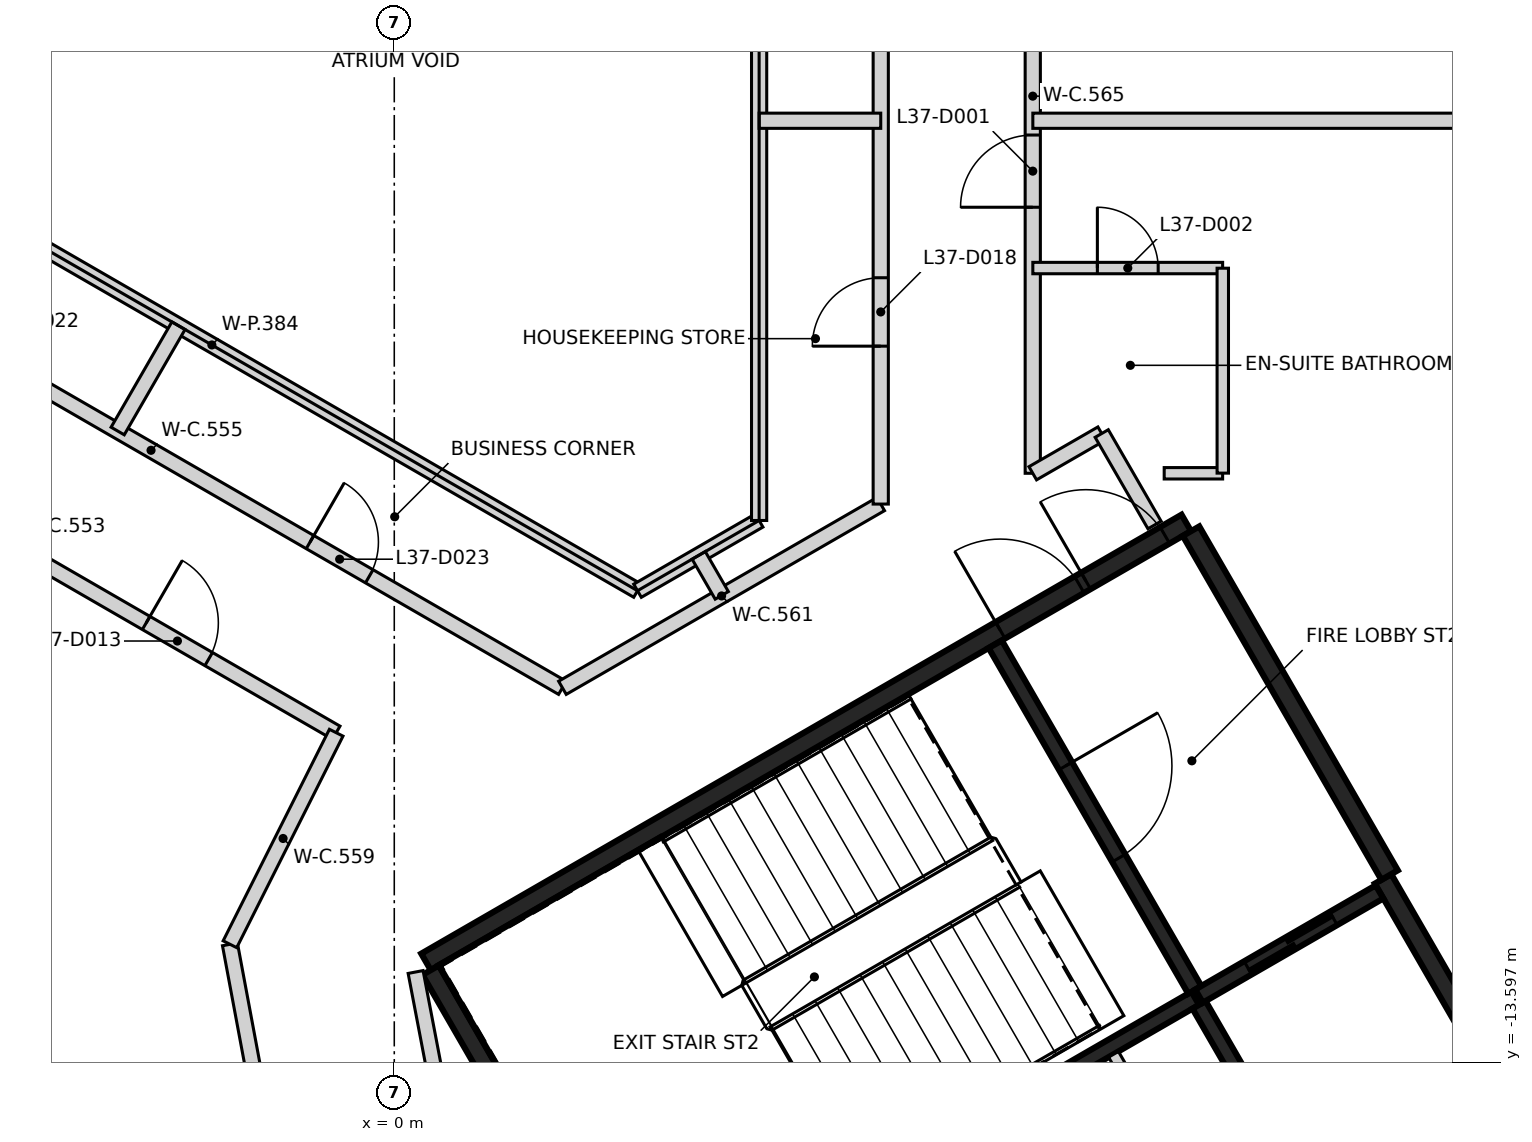
"""IFC4 building model, lengths in metres.
Left out: names, types, materials, properties, quantities, classifications, styles, units other than length and angle.
Written with IfcOpenShell. Run it as: python <this file> out.ifc"""

import sys

from ifc_helpers import new_model, si_unit, direction, frame, frame_2d, origin, place, context, subcontext, project, spatial, rectangle, extrude, element, fill, save


model = new_model("IFC4")
c1 = context("Model", 3, precision=1e-05, world=origin(), true_north=direction((0.0, 1.0)))
c2 = subcontext(c1, "Body", "Model", "MODEL_VIEW")
j1 = project(units=[si_unit("LENGTHUNIT", "METRE"), si_unit("PLANEANGLEUNIT", "RADIAN")], contexts=[c1])
p1 = place(None, origin())
s1 = spatial("IfcSite", under=j1, at=p1, CompositionType="ELEMENT")
p2 = place(p1, origin())
s2 = spatial("IfcBuilding", under=s1, at=p2, CompositionType="ELEMENT")
p3 = place(p2, frame((0.0, 0.0, 150.4)))
s3 = spatial("IfcBuildingStorey", under=s2, at=p3, CompositionType="ELEMENT", Elevation=150.4)
p4 = place(p3, frame((0.417, -12.273, 0.0), z_axis=(0.0, 0.0, 1.0), x_axis=(0.866021906294, 0.500006057782, 0.0)))
e1 = element("IfcWall", 1, at=p4, inside=s3, PredefinedType="SHEAR", context=c2, shape_type="SweptSolid", body=[
    extrude(rectangle(XDim=11.55, YDim=0.25, at=frame_2d((5.775, 0.0))), origin(), (0.0, 0.0, 1.0), 3.2),
])
p5 = place(p4, frame((10.025, 0.0, 0.0)))
e2 = element("IfcOpeningElement", 2, at=p5, cuts=e1, PredefinedType="OPENING", context=c2, shape_type="SweptSolid", body=[
    extrude(rectangle(XDim=1.2, YDim=2.1, at=frame_2d((0.6, 1.05))), frame((0.0, 0.135, 0.0), z_axis=(0.0, -1.0, 0.0), x_axis=(1.0, 0.0, 0.0)), (0.0, 0.0, 1.0), 0.27),
])
p6 = place(p4, frame((8.725, 0.0, 0.0)))
e3 = element("IfcOpeningElement", 3, at=p6, cuts=e1, PredefinedType="OPENING", context=c2, shape_type="SweptSolid", body=[
    extrude(rectangle(XDim=1.2, YDim=2.1, at=frame_2d((0.6, 1.05))), frame((0.0, 0.135, 0.0), z_axis=(0.0, -1.0, 0.0), x_axis=(1.0, 0.0, 0.0)), (0.0, 0.0, 1.0), 0.27),
])
p7 = place(p3, frame((13.008, -11.181, 0.0), z_axis=(0.0, 0.0, 1.0), x_axis=(0.500004234368, -0.866022959057, 0.0)))
e4 = element("IfcWall", 4, at=p7, inside=s3, PredefinedType="SHEAR", context=c2, shape_type="SweptSolid", body=[
    extrude(rectangle(XDim=6.25, YDim=0.25, at=frame_2d((3.125, 0.0))), origin(), (0.0, 0.0, 1.0), 3.2),
])
p8 = place(p3, frame((3.235, -17.153, 0.0), z_axis=(0.0, 0.0, 1.0), x_axis=(-0.500008851346, 0.866020293397, 0.0)))
e5 = element("IfcWall", 5, at=p8, inside=s3, PredefinedType="SHEAR", context=c2, shape_type="SweptSolid", body=[
    extrude(rectangle(XDim=5.51, YDim=0.25, at=frame_2d((2.755, 0.0))), origin(), (0.0, 0.0, 1.0), 3.2),
])
p9 = place(p3, frame((10.483, -6.606, 0.0), z_axis=(0.0, 0.0, 1.0), x_axis=(0.49999885962, -0.866026062182, 0.0)))
e6 = element("IfcWall", 6, at=p9, inside=s3, PredefinedType="SHEAR", context=c2, shape_type="SweptSolid", body=[
    extrude(rectangle(XDim=5.225, YDim=0.25, at=frame_2d((2.612, 0.0))), origin(), (0.0, 0.0, 1.0), 3.2),
])
p10 = place(p3, frame((10.538, -12.752, 0.0), z_axis=(0.0, 0.0, 1.0), x_axis=(-0.866038630372, -0.499977090179, 0.0)))
e7 = element("IfcWall", 7, at=p10, inside=s3, PredefinedType="SHEAR", context=c2, shape_type="SweptSolid", body=[
    extrude(rectangle(XDim=5.699, YDim=0.2, at=frame_2d((2.85, 0.0))), origin(), (0.0, 0.0, 1.0), 3.2),
])
p11 = place(p3, frame((7.906, -8.094, 0.0), z_axis=(0.0, 0.0, 1.0), x_axis=(0.500024287448, -0.866011380966, 0.0)))
e8 = element("IfcWall", 8, at=p11, inside=s3, PredefinedType="SHEAR", context=c2, shape_type="SweptSolid", body=[
    extrude(rectangle(XDim=5.251, YDim=0.2, at=frame_2d((2.625, 0.0))), origin(), (0.0, 0.0, 1.0), 3.2),
])
p12 = place(p11, frame((1.849, 0.0, 0.0)))
e9 = element("IfcOpeningElement", 9, at=p12, cuts=e8, PredefinedType="OPENING", context=c2, shape_type="SweptSolid", body=[
    extrude(rectangle(XDim=1.4, YDim=2.1, at=frame_2d((0.7, 1.05))), frame((0.0, 0.11, 0.0), z_axis=(0.0, -1.0, 0.0), x_axis=(1.0, 0.0, 0.0)), (0.0, 0.0, 1.0), 0.22),
])
p13 = place(p3, frame((11.963, -15.22, 0.0), z_axis=(0.0, 0.0, 1.0), x_axis=(-0.500034990121, 0.866005201286, 0.0)))
e10 = element("IfcWall", 10, at=p13, inside=s3, PredefinedType="SHEAR", context=c2, shape_type="SweptSolid", body=[
    extrude(rectangle(XDim=2.75, YDim=0.2, at=frame_2d((1.375, 0.0))), origin(), (0.0, 0.0, 1.0), 3.2),
])
p14 = place(p3, frame((10.587, -12.723, 0.0), z_axis=(0.0, 0.0, 1.0), x_axis=(0.866037306777, 0.499979382845, 0.0)))
e11 = element("IfcWall", 11, at=p14, inside=s3, PredefinedType="SHEAR", context=c2, shape_type="SweptSolid", body=[
    extrude(rectangle(XDim=2.742, YDim=0.2, at=frame_2d((1.371, 0.0))), origin(), (0.0, 0.0, 1.0), 3.2),
])
p15 = place(p14, frame((0.743, 0.0, 0.0)))
e12 = element("IfcOpeningElement", 12, at=p15, cuts=e11, PredefinedType="OPENING", context=c2, shape_type="SweptSolid", body=[
    extrude(rectangle(XDim=1.3, YDim=2.1, at=frame_2d((0.65, 1.05))), frame((0.0, 0.11, 0.0), z_axis=(0.0, -1.0, 0.0), x_axis=(1.0, 0.0, 0.0)), (0.0, 0.0, 1.0), 0.22),
])
p16 = place(p3, frame((9.462, -13.489, 0.0), z_axis=(0.0, 0.0, 1.0), x_axis=(0.499988999718, -0.866031754707, 0.0)))
e13 = element("IfcWall", 13, at=p16, inside=s3, PredefinedType="PARTITIONING", context=c2, shape_type="SweptSolid", body=[
    extrude(rectangle(XDim=2.749, YDim=0.15, at=frame_2d((1.374, 0.0))), origin(), (0.0, 0.0, 1.0), 3.2),
])
p17 = place(p3, frame((-9.261, -4.351, 0.0), z_axis=(0.0, 0.0, 1.0), x_axis=(0.865985037707, -0.500069909581, 0.0)))
e14 = element("IfcWall", 14, at=p17, inside=s3, PredefinedType="PARTITIONING", context=c2, shape_type="SweptSolid", body=[
    extrude(rectangle(XDim=9.812, YDim=0.2, at=frame_2d((4.906, 0.0))), origin(), (0.0, 0.0, 1.0), 3.2),
])
p18 = place(p17, frame((6.925, 0.0, 0.0)))
e15 = element("IfcOpeningElement", 15, at=p18, cuts=e14, PredefinedType="OPENING", context=c2, shape_type="SweptSolid", body=[
    extrude(rectangle(XDim=0.95, YDim=2.1, at=frame_2d((0.475, 1.05))), frame((0.0, 0.11, 0.0), z_axis=(0.0, -1.0, 0.0), x_axis=(1.0, 0.0, 0.0)), (0.0, 0.0, 1.0), 0.22),
])
p19 = place(p3, frame((-8.612, -2.418, 0.0), z_axis=(0.0, 0.0, 1.0), x_axis=(0.866023916678, -0.500002575735, 0.0)))
e16 = element("IfcWall", 16, at=p19, inside=s3, PredefinedType="PARTITIONING", context=c2, shape_type="SweptSolid", body=[
    extrude(rectangle(XDim=12.499, YDim=0.2, at=frame_2d((6.249, 0.0))), origin(), (0.0, 0.0, 1.0), 3.2),
])
p20 = place(p19, frame((2.427, 0.0, 0.0)))
e17 = element("IfcOpeningElement", 17, at=p20, cuts=e16, PredefinedType="OPENING", context=c2, shape_type="SweptSolid", body=[
    extrude(rectangle(XDim=0.9, YDim=2.1, at=frame_2d((0.45, 1.05))), frame((0.0, 0.11, 0.0), z_axis=(0.0, -1.0, 0.0), x_axis=(1.0, 0.0, 0.0)), (0.0, 0.0, 1.0), 0.22),
])
p21 = place(p19, frame((8.665, 0.0, 0.0)))
e18 = element("IfcOpeningElement", 18, at=p21, cuts=e16, PredefinedType="OPENING", context=c2, shape_type="SweptSolid", body=[
    extrude(rectangle(XDim=0.9, YDim=2.1, at=frame_2d((0.45, 1.05))), frame((0.0, 0.11, 0.0), z_axis=(0.0, -1.0, 0.0), x_axis=(1.0, 0.0, 0.0)), (0.0, 0.0, 1.0), 0.22),
])
p22 = place(p3, frame((-2.162, -12.042, 0.0), z_axis=(0.0, 0.0, 1.0), x_axis=(0.18377734651, -0.982967897192, 0.0)))
e19 = element("IfcWall", 19, at=p22, inside=s3, PredefinedType="PARTITIONING", context=c2, shape_type="SweptSolid", body=[
    extrude(rectangle(XDim=7.094, YDim=0.2, at=frame_2d((3.547, 0.0))), origin(), (0.0, 0.0, 1.0), 3.2),
])
p23 = place(p3, frame((-2.162, -12.041, 0.0), z_axis=(0.0, 0.0, 1.0), x_axis=(0.448937335771, 0.893563242614, 0.0)))
e20 = element("IfcWall", 20, at=p23, inside=s3, PredefinedType="PARTITIONING", context=c2, shape_type="SweptSolid", body=[
    extrude(rectangle(XDim=3.115, YDim=0.2, at=frame_2d((1.557, 0.0))), origin(), (0.0, 0.0, 1.0), 3.2),
])
p24 = place(p3, frame((0.281, -12.406, 0.0), z_axis=(0.0, 0.0, 1.0), x_axis=(0.187814940093, -0.982204433037, 0.0)))
e21 = element("IfcWall", 21, at=p24, inside=s3, PredefinedType="PARTITIONING", context=c2, shape_type="SweptSolid", body=[
    extrude(rectangle(XDim=5.842, YDim=0.2, at=frame_2d((2.921, 0.0))), origin(), (0.0, 0.0, 1.0), 3.2),
])
p25 = place(p24, frame((2.363, 0.0, 0.0)))
e22 = element("IfcOpeningElement", 22, at=p25, cuts=e21, PredefinedType="OPENING", context=c2, shape_type="SweptSolid", body=[
    extrude(rectangle(XDim=1.0, YDim=2.1, at=frame_2d((0.5, 1.05))), frame((0.0, 0.11, 0.0), z_axis=(0.0, -1.0, 0.0), x_axis=(1.0, 0.0, 0.0)), (0.0, 0.0, 1.0), 0.22),
])
p26 = place(p3, frame((2.212, -8.667, 0.0), z_axis=(0.0, 0.0, 1.0), x_axis=(0.866053587187, 0.499951181737, 0.0)))
e23 = element("IfcWall", 23, at=p26, inside=s3, PredefinedType="PARTITIONING", context=c2, shape_type="SweptSolid", body=[
    extrude(rectangle(XDim=4.835, YDim=0.2, at=frame_2d((2.418, 0.0))), origin(), (0.0, 0.0, 1.0), 2.3),
])
p27 = place(p3, frame((6.4, -6.25, 0.0), z_axis=(0.0, 0.0, 1.0), x_axis=(0.0, 1.0, 0.0)))
e24 = element("IfcWall", 24, at=p27, inside=s3, PredefinedType="PARTITIONING", context=c2, shape_type="SweptSolid", body=[
    extrude(rectangle(XDim=12.5, YDim=0.2, at=frame_2d((6.25, 0.0))), origin(), (0.0, 0.0, 1.0), 3.2),
])
p28 = place(p27, frame((2.077, 0.0, 0.0)))
e25 = element("IfcOpeningElement", 25, at=p28, cuts=e24, PredefinedType="OPENING", context=c2, shape_type="SweptSolid", body=[
    extrude(rectangle(XDim=0.9, YDim=2.1, at=frame_2d((0.45, 1.05))), frame((0.0, 0.11, 0.0), z_axis=(0.0, -1.0, 0.0), x_axis=(1.0, 0.0, 0.0)), (0.0, 0.0, 1.0), 0.22),
])
p29 = place(p27, frame((8.315, 0.0, 0.0)))
e26 = element("IfcOpeningElement", 26, at=p29, cuts=e24, PredefinedType="OPENING", context=c2, shape_type="SweptSolid", body=[
    extrude(rectangle(XDim=0.9, YDim=2.1, at=frame_2d((0.45, 1.05))), frame((0.0, 0.11, 0.0), z_axis=(0.0, -1.0, 0.0), x_axis=(1.0, 0.0, 0.0)), (0.0, 0.0, 1.0), 0.22),
])
p30 = place(p3, frame((8.4, -5.845, 0.0), z_axis=(0.0, 0.0, 1.0), x_axis=(0.0, 1.0, 0.0)))
e27 = element("IfcWall", 27, at=p30, inside=s3, PredefinedType="PARTITIONING", context=c2, shape_type="SweptSolid", body=[
    extrude(rectangle(XDim=9.923, YDim=0.2, at=frame_2d((4.961, 0.0))), origin(), (0.0, 0.0, 1.0), 3.2),
])
p31 = place(p30, frame((3.5, 0.0, 0.0)))
e28 = element("IfcOpeningElement", 28, at=p31, cuts=e27, PredefinedType="OPENING", context=c2, shape_type="SweptSolid", body=[
    extrude(rectangle(XDim=0.95, YDim=2.1, at=frame_2d((0.475, 1.05))), frame((0.0, 0.11, 0.0), z_axis=(0.0, -1.0, 0.0), x_axis=(1.0, 0.0, 0.0)), (0.0, 0.0, 1.0), 0.22),
])
p32 = place(p30, frame((6.023, 0.0, 0.0)))
e29 = element("IfcOpeningElement", 29, at=p32, cuts=e27, PredefinedType="OPENING", context=c2, shape_type="SweptSolid", body=[
    extrude(rectangle(XDim=0.95, YDim=2.1, at=frame_2d((0.475, 1.05))), frame((0.0, 0.11, 0.0), z_axis=(0.0, -1.0, 0.0), x_axis=(1.0, 0.0, 0.0)), (0.0, 0.0, 1.0), 0.22),
])
p33 = place(p3, frame((8.4, -5.845, 0.0), z_axis=(0.0, 0.0, 1.0), x_axis=(0.866313671633, 0.499500372715, 0.0)))
e30 = element("IfcWall", 30, at=p33, inside=s3, PredefinedType="PARTITIONING", context=c2, shape_type="SweptSolid", body=[
    extrude(rectangle(XDim=1.047, YDim=0.2, at=frame_2d((0.523, 0.0))), origin(), (0.0, 0.0, 1.0), 3.2),
])
p34 = place(p3, frame((9.307, -5.322, 0.0), z_axis=(0.0, 0.0, 1.0), x_axis=(0.499955621637, -0.866051024128, 0.0)))
e31 = element("IfcWall", 31, at=p34, inside=s3, PredefinedType="PARTITIONING", context=c2, shape_type="SweptSolid", body=[
    extrude(rectangle(XDim=1.39, YDim=0.2, at=frame_2d((0.695, 0.0))), origin(), (0.0, 0.0, 1.0), 3.2),
])
p35 = place(p3, frame((-8.0, -0.924, 0.0), z_axis=(0.0, 0.0, 1.0), x_axis=(0.866062358179, -0.499935987647, 0.0)))
e32 = element("IfcWall", 32, at=p35, inside=s3, PredefinedType="PARTITIONING", context=c2, shape_type="SweptSolid", body=[
    extrude(rectangle(XDim=12.932, YDim=0.2, at=frame_2d((6.466, 0.0))), origin(), (0.0, 0.0, 1.0), 2.3),
])
p36 = place(p3, frame((-3.639, -5.289, 0.0), z_axis=(0.0, 0.0, 1.0), x_axis=(0.49981490623, 0.866132241352, 0.0)))
e33 = element("IfcWall", 33, at=p36, inside=s3, PredefinedType="PARTITIONING", context=c2, shape_type="SweptSolid", body=[
    extrude(rectangle(XDim=1.6, YDim=0.2, at=frame_2d((0.8, 0.0))), origin(), (0.0, 0.0, 1.0), 2.3),
])
p37 = place(p3, frame((3.2, -7.39, 0.0), z_axis=(0.0, 0.0, 1.0), x_axis=(0.865875248522, 0.500259986404, 0.0)))
e34 = element("IfcWall", 34, at=p37, inside=s3, PredefinedType="PARTITIONING", context=c2, shape_type="SweptSolid", body=[
    extrude(rectangle(XDim=1.848, YDim=0.2, at=frame_2d((0.924, 0.0))), origin(), (0.0, 0.0, 1.0), 2.3),
])
p38 = place(p3, frame((4.005, -6.925, 0.0), z_axis=(0.0, 0.0, 1.0), x_axis=(0.499942781752, -0.866058436235, 0.0)))
e35 = element("IfcWall", 35, at=p38, inside=s3, PredefinedType="PARTITIONING", context=c2, shape_type="SweptSolid", body=[
    extrude(rectangle(XDim=0.607, YDim=0.2, at=frame_2d((0.304, 0.0))), origin(), (0.0, 0.0, 1.0), 2.3),
])
p39 = place(p3, frame((4.8, -6.466, 0.0), z_axis=(0.0, 0.0, 1.0), x_axis=(0.0, 1.0, 0.0)))
e36 = element("IfcWall", 36, at=p39, inside=s3, PredefinedType="PARTITIONING", context=c2, shape_type="SweptSolid", body=[
    extrude(rectangle(XDim=12.932, YDim=0.2, at=frame_2d((6.466, 0.0))), origin(), (0.0, 0.0, 1.0), 2.3),
])
p40 = place(p3, frame((4.8, -1.207, 0.0), z_axis=(0.0, 0.0, 1.0), x_axis=(1.0, 0.0, 0.0)))
e37 = element("IfcWall", 37, at=p40, inside=s3, PredefinedType="PARTITIONING", context=c2, shape_type="SweptSolid", body=[
    extrude(rectangle(XDim=1.6, YDim=0.2, at=frame_2d((0.8, 0.0))), origin(), (0.0, 0.0, 1.0), 2.3),
])
p41 = place(p3, frame((8.401, -1.207, 0.0), z_axis=(0.0, 0.0, 1.0), x_axis=(1.0, 0.0, 0.0)))
e38 = element("IfcWall", 38, at=p41, inside=s3, PredefinedType="PARTITIONING", context=c2, shape_type="SweptSolid", body=[
    extrude(rectangle(XDim=13.226, YDim=0.2, at=frame_2d((6.613, 0.0))), origin(), (0.0, 0.0, 1.0), 2.3),
])
p42 = place(p3, frame((8.401, -3.145, 0.0), z_axis=(0.0, 0.0, 1.0), x_axis=(1.0, 0.0, 0.0)))
e39 = element("IfcWall", 39, at=p42, inside=s3, PredefinedType="PARTITIONING", context=c2, shape_type="SweptSolid", body=[
    extrude(rectangle(XDim=2.497, YDim=0.15, at=frame_2d((1.249, 0.0))), origin(), (0.0, 0.0, 1.0), 3.2),
])
p43 = place(p42, frame((0.849, 0.0, 0.0)))
e40 = element("IfcOpeningElement", 40, at=p43, cuts=e39, PredefinedType="OPENING", context=c2, shape_type="SweptSolid", body=[
    extrude(rectangle(XDim=0.8, YDim=2.1, at=frame_2d((0.4, 1.05))), frame((0.0, 0.085, 0.0), z_axis=(0.0, -1.0, 0.0), x_axis=(1.0, 0.0, 0.0)), (0.0, 0.0, 1.0), 0.17),
])
p44 = place(p3, frame((10.898, -5.845, 0.0), z_axis=(0.0, 0.0, 1.0), x_axis=(-1.0, 0.0, 0.0)))
e41 = element("IfcWall", 41, at=p44, inside=s3, PredefinedType="PARTITIONING", context=c2, shape_type="SweptSolid", body=[
    extrude(rectangle(XDim=0.769, YDim=0.15, at=frame_2d((0.384, 0.0))), origin(), (0.0, 0.0, 1.0), 3.2),
])
p45 = place(p3, frame((10.9, -5.843, 0.0), z_axis=(0.0, 0.0, 1.0), x_axis=(0.0, 1.0, 0.0)))
e42 = element("IfcWall", 42, at=p45, inside=s3, PredefinedType="PARTITIONING", context=c2, shape_type="SweptSolid", body=[
    extrude(rectangle(XDim=2.696, YDim=0.15, at=frame_2d((1.348, 0.0))), origin(), (0.0, 0.0, 1.0), 3.2),
])
p46 = place(p15, origin())
e43 = element("IfcDoor", 43, at=p46, inside=s3, OperationType="SLIDING_TO_RIGHT", PredefinedType="DOOR", context=c2, shape_type="SweptSolid", body=[
    extrude(rectangle(XDim=1.3, YDim=2.1, at=frame_2d((0.65, 1.05))), frame((0.0, 0.025, 0.0), z_axis=(0.0, -1.0, 0.0), x_axis=(1.0, 0.0, 0.0)), (0.0, 0.0, 1.0), 0.05),
])
fill(e12, e43)
p47 = place(p5, origin())
e44 = element("IfcDoor", 44, at=p47, inside=s3, OperationType="SINGLE_SWING_LEFT", PredefinedType="DOOR", context=c2, shape_type="SweptSolid", body=[
    extrude(rectangle(XDim=1.2, YDim=2.1, at=frame_2d((0.6, 1.05))), frame((0.0, 0.025, 0.0), z_axis=(0.0, -1.0, 0.0), x_axis=(1.0, 0.0, 0.0)), (0.0, 0.0, 1.0), 0.05),
])
fill(e2, e44)
p48 = place(p6, origin())
e45 = element("IfcDoor", 45, at=p48, inside=s3, OperationType="SINGLE_SWING_RIGHT", PredefinedType="DOOR", context=c2, shape_type="SweptSolid", body=[
    extrude(rectangle(XDim=1.2, YDim=2.1, at=frame_2d((0.6, 1.05))), frame((0.0, 0.025, 0.0), z_axis=(0.0, -1.0, 0.0), x_axis=(1.0, 0.0, 0.0)), (0.0, 0.0, 1.0), 0.05),
])
fill(e3, e45)
p49 = place(p12, origin())
e46 = element("IfcDoor", 46, at=p49, inside=s3, OperationType="SINGLE_SWING_RIGHT", PredefinedType="DOOR", context=c2, shape_type="SweptSolid", body=[
    extrude(rectangle(XDim=1.4, YDim=2.1, at=frame_2d((0.7, 1.05))), frame((0.0, 0.025, 0.0), z_axis=(0.0, -1.0, 0.0), x_axis=(1.0, 0.0, 0.0)), (0.0, 0.0, 1.0), 0.05),
])
fill(e9, e46)
p50 = place(p31, frame((0.95, 0.0, 0.0), z_axis=(0.0, 0.0, 1.0), x_axis=(-1.0, 0.0, 0.0)))
e47 = element("IfcDoor", 47, at=p50, inside=s3, OperationType="SINGLE_SWING_LEFT", PredefinedType="DOOR", context=c2, shape_type="SweptSolid", body=[
    extrude(rectangle(XDim=0.95, YDim=2.1, at=frame_2d((0.475, 1.05))), frame((0.0, 0.025, 0.0), z_axis=(0.0, -1.0, 0.0), x_axis=(1.0, 0.0, 0.0)), (0.0, 0.0, 1.0), 0.05),
])
fill(e28, e47)
p51 = place(p43, frame((0.8, 0.0, 0.0), z_axis=(0.0, 0.0, 1.0), x_axis=(-1.0, 0.0, 0.0)))
e48 = element("IfcDoor", 48, at=p51, inside=s3, OperationType="SINGLE_SWING_LEFT", PredefinedType="DOOR", context=c2, shape_type="SweptSolid", body=[
    extrude(rectangle(XDim=0.8, YDim=2.1, at=frame_2d((0.4, 1.05))), frame((0.0, 0.025, 0.0), z_axis=(0.0, -1.0, 0.0), x_axis=(1.0, 0.0, 0.0)), (0.0, 0.0, 1.0), 0.05),
])
fill(e40, e48)
p52 = place(p18, frame((0.95, 0.0, 0.0), z_axis=(0.0, 0.0, 1.0), x_axis=(-1.0, 0.0, 0.0)))
e49 = element("IfcDoor", 49, at=p52, inside=s3, OperationType="SINGLE_SWING_LEFT", PredefinedType="DOOR", context=c2, shape_type="SweptSolid", body=[
    extrude(rectangle(XDim=0.95, YDim=2.1, at=frame_2d((0.475, 1.05))), frame((0.0, 0.025, 0.0), z_axis=(0.0, -1.0, 0.0), x_axis=(1.0, 0.0, 0.0)), (0.0, 0.0, 1.0), 0.05),
])
fill(e15, e49)
p53 = place(p28, origin())
e50 = element("IfcDoor", 50, at=p53, inside=s3, OperationType="SINGLE_SWING_LEFT", PredefinedType="DOOR", context=c2, shape_type="SweptSolid", body=[
    extrude(rectangle(XDim=0.9, YDim=2.1, at=frame_2d((0.45, 1.05))), frame((0.0, 0.025, 0.0), z_axis=(0.0, -1.0, 0.0), x_axis=(1.0, 0.0, 0.0)), (0.0, 0.0, 1.0), 0.05),
])
fill(e25, e50)
p54 = place(p21, origin())
e51 = element("IfcDoor", 51, at=p54, inside=s3, OperationType="SINGLE_SWING_LEFT", PredefinedType="DOOR", context=c2, shape_type="SweptSolid", body=[
    extrude(rectangle(XDim=0.9, YDim=2.1, at=frame_2d((0.45, 1.05))), frame((0.0, 0.025, 0.0), z_axis=(0.0, -1.0, 0.0), x_axis=(1.0, 0.0, 0.0)), (0.0, 0.0, 1.0), 0.05),
])
fill(e18, e51)
save(model, sys.argv[1])
